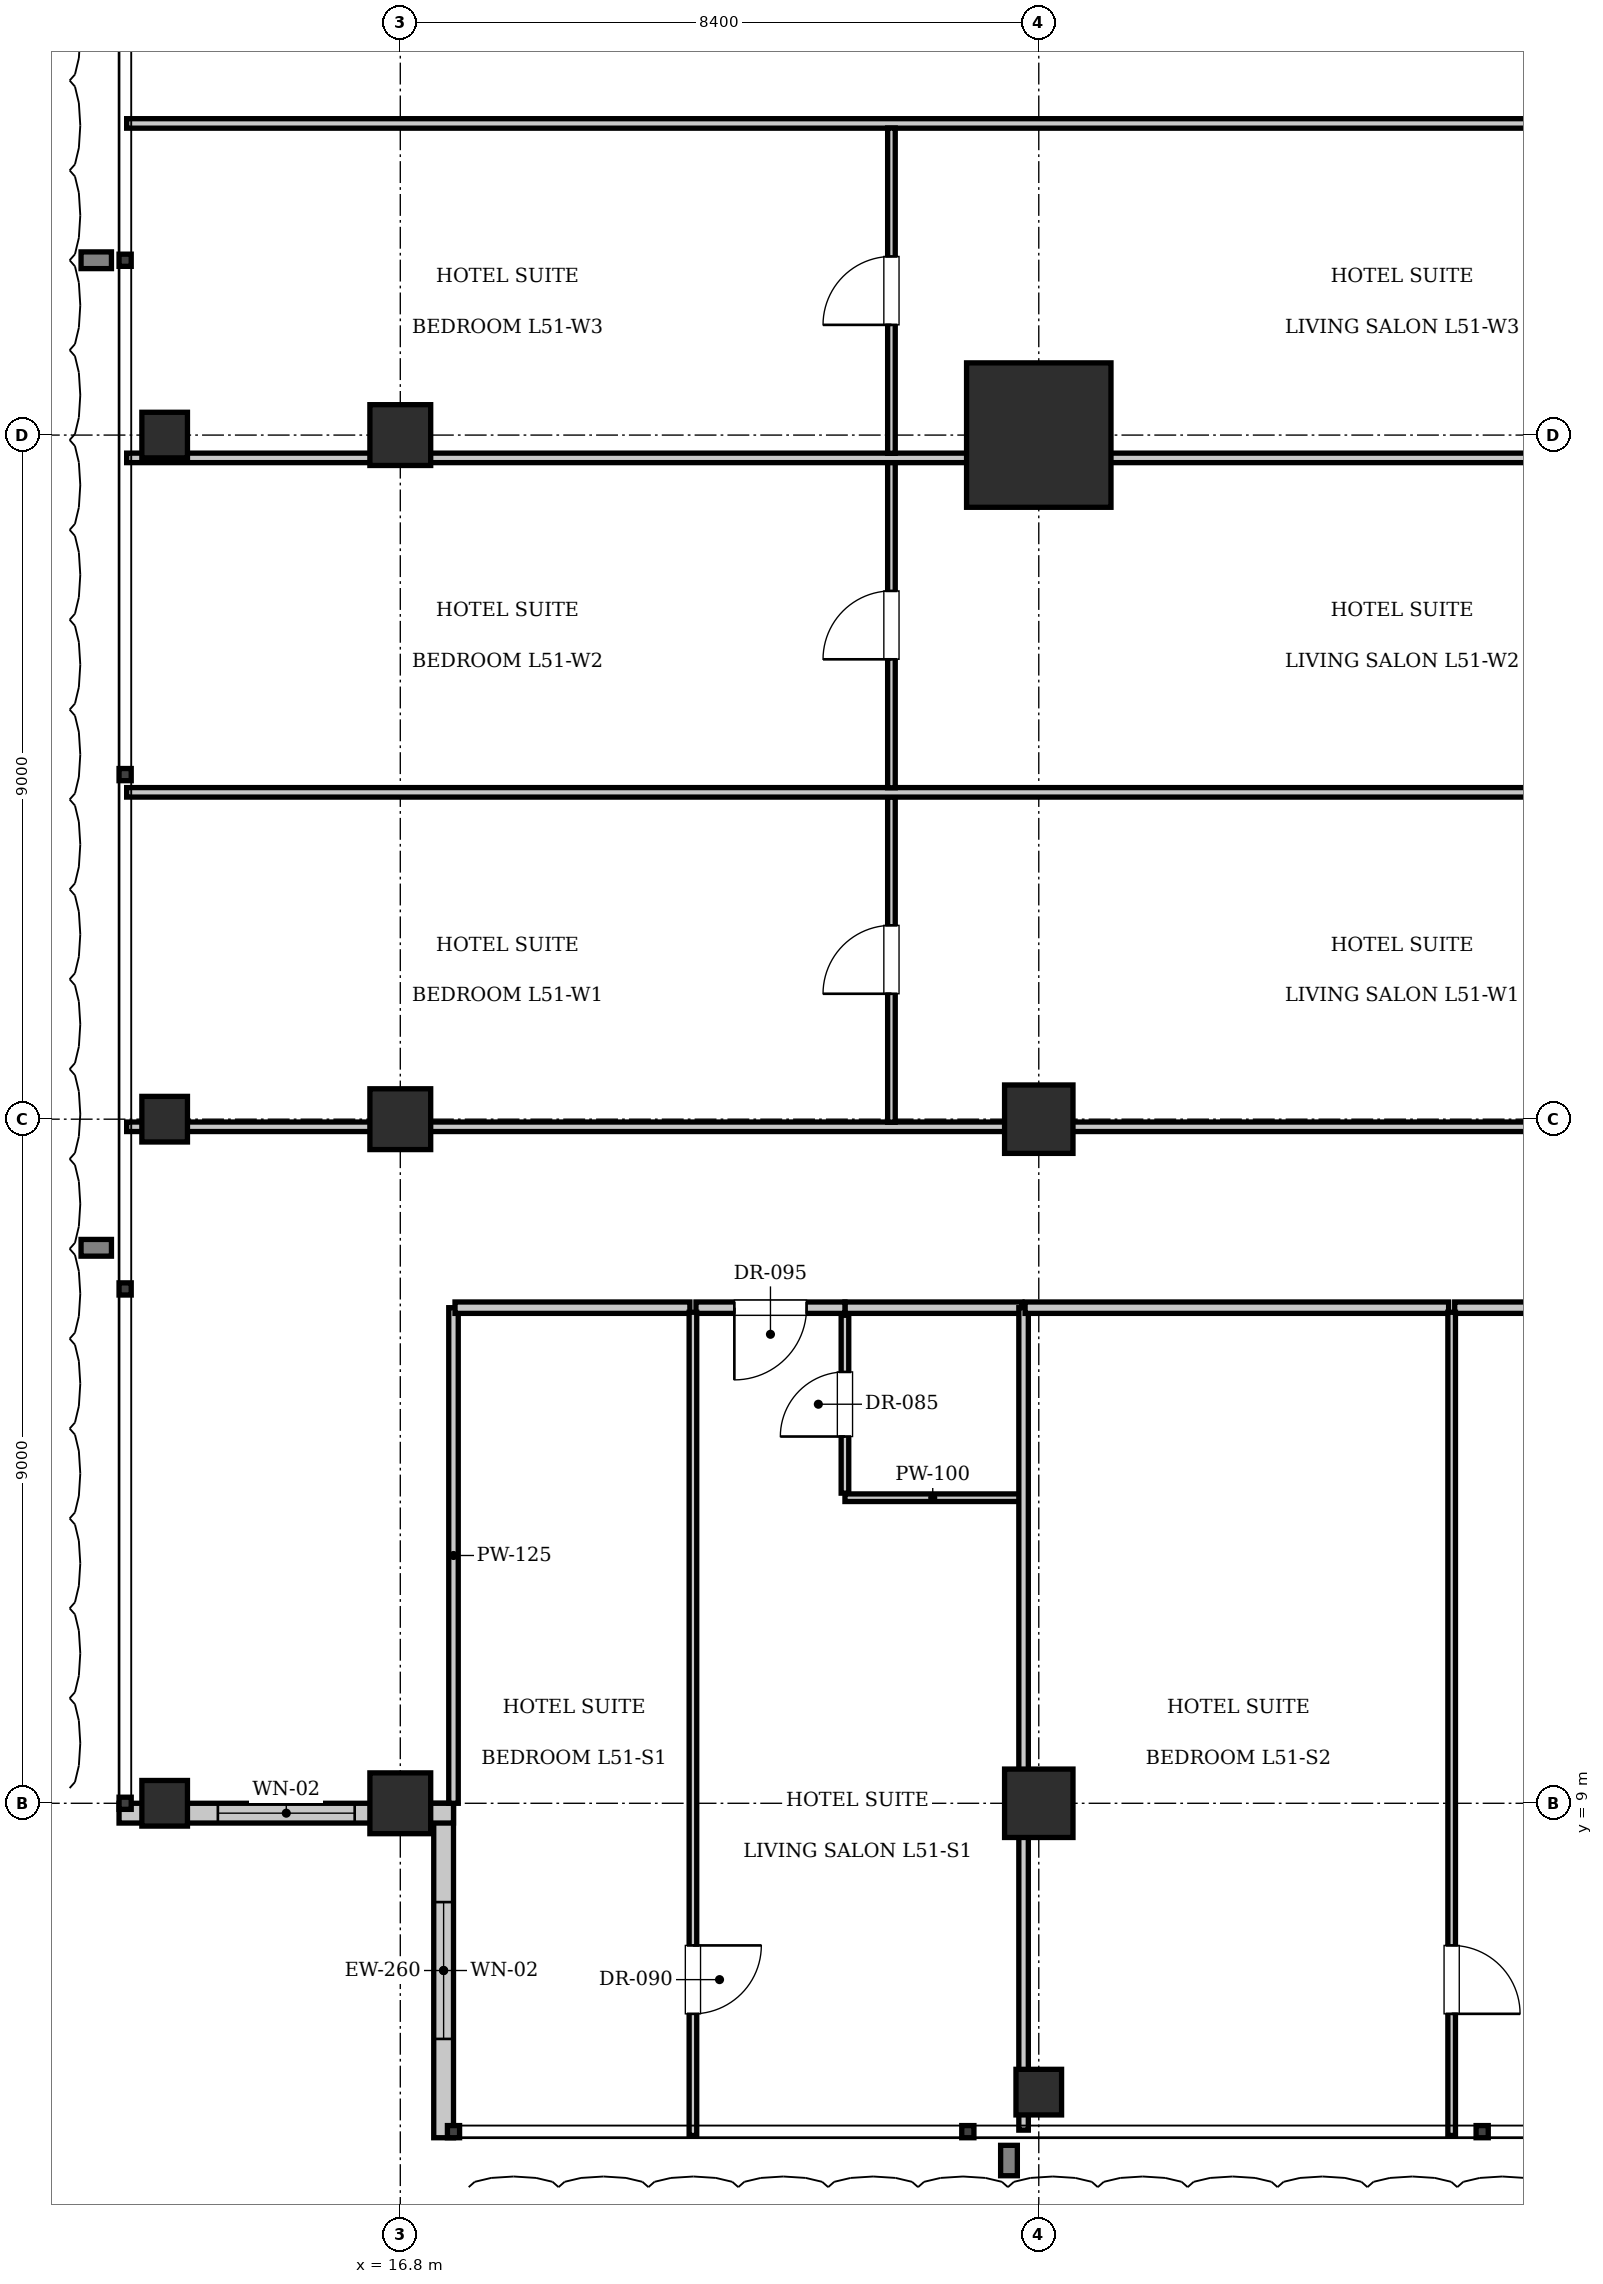
"""IFC4 building model, lengths in metres.
Left out: names, types, materials, properties, quantities, classifications, styles, units other than length and angle.
Written with IfcOpenShell. Run it as: python <this file> out.ifc"""

import sys

from ifc_helpers import new_model, si_unit, direction, frame, frame_2d, origin, origin_2d, place, context, subcontext, project, spatial, rectangle, i_section, extrude, element, fill, save


model = new_model("IFC4")
c1 = context("Model", 3, precision=1e-05, world=origin(), true_north=direction((0.0, 1.0)))
c2 = subcontext(c1, "Body", "Model", "MODEL_VIEW")
j1 = project(units=[si_unit("LENGTHUNIT", "METRE"), si_unit("PLANEANGLEUNIT", "RADIAN")], contexts=[c1])
p1 = place(None, origin())
s1 = spatial("IfcSite", under=j1, at=p1, CompositionType="ELEMENT")
p2 = place(p1, origin())
s2 = spatial("IfcBuilding", under=s1, at=p2, CompositionType="ELEMENT")
p3 = place(p2, frame((0.0, 0.0, 208.25)))
s3 = spatial("IfcBuildingStorey", under=s2, at=p3, CompositionType="ELEMENT", Elevation=208.25)
p4 = place(p3, frame((25.2, 27.0, 0.0), z_axis=(0.0, 0.0, 1.0), x_axis=(1.0, 0.0, 0.0)))
e1 = element("IfcColumn", 1, at=p4, inside=s3, PredefinedType="COLUMN", context=c2, shape_type="SweptSolid", body=[
    extrude(rectangle(XDim=1.9, YDim=1.9, at=origin_2d()), origin(), (0.0, 0.0, 1.0), 3.85),
])
for number, where, z_axis, x_axis in (
    (2, (25.2, 18.0, 0.0), (0.0, 0.0, 1.0), (1.0, 0.0, 0.0)),
    (3, (25.2, 9.0, 0.0), (0.0, 0.0, 1.0), (1.0, 0.0, 0.0)),
):
    element("IfcColumn", number, at=place(p3, frame(where, z_axis=z_axis, x_axis=x_axis)), inside=s3, PredefinedType="COLUMN", context=c2, shape_type="SweptSolid", body=[
        extrude(rectangle(XDim=0.9, YDim=0.9, at=origin_2d()), origin(), (0.0, 0.0, 1.0), 3.85),
    ])
for number, where, z_axis, x_axis in (
    (4, (16.8, 9.0, 0.0), (0.0, 0.0, 1.0), (1.0, 0.0, 0.0)),
    (5, (16.8, 18.0, 0.0), (0.0, 0.0, 1.0), (1.0, 0.0, 0.0)),
    (6, (16.8, 27.0, 0.0), (0.0, 0.0, 1.0), (1.0, 0.0, 0.0)),
):
    element("IfcColumn", number, at=place(p3, frame(where, z_axis=z_axis, x_axis=x_axis)), inside=s3, PredefinedType="COLUMN", context=c2, shape_type="SweptSolid", body=[
        extrude(rectangle(XDim=0.8, YDim=0.8, at=origin_2d()), origin(), (0.0, 0.0, 1.0), 3.85),
    ])
for number, where, z_axis, x_axis in (
    (7, (13.7, 9.0, 0.0), (0.0, 0.0, 1.0), (1.0, 0.0, 0.0)),
    (8, (13.7, 18.0, 0.0), (0.0, 0.0, 1.0), (1.0, 0.0, 0.0)),
    (9, (13.7, 27.0, 0.0), (0.0, 0.0, 1.0), (1.0, 0.0, 0.0)),
    (10, (25.2, 5.2, 0.0), (0.0, 0.0, 1.0), (1.0, 0.0, 0.0)),
):
    element("IfcColumn", number, at=place(p3, frame(where, z_axis=z_axis, x_axis=x_axis)), inside=s3, PredefinedType="COLUMN", context=c2, shape_type="SweptSolid", body=[
        extrude(i_section(OverallWidth=0.6, OverallDepth=0.6, WebThickness=0.025, FlangeThickness=0.038, at=origin_2d()), origin(), (0.0, 0.0, 1.0), 3.85),
    ])
p5 = place(p3, frame((17.37, 4.6, 0.0), z_axis=(0.0, 0.0, 1.0), x_axis=(0.0, 1.0, 0.0)))
e11 = element("IfcWall", 11, at=p5, inside=s3, PredefinedType="SOLIDWALL", context=c2, shape_type="SweptSolid", body=[
    extrude(rectangle(XDim=4.4, YDim=0.26, at=frame_2d((2.2, 0.0))), origin(), (0.0, 0.0, 1.0), 3.61),
])
p6 = place(p5, frame((1.3, 0.0, 0.9)))
e12 = element("IfcOpeningElement", 12, at=p6, cuts=e11, PredefinedType="OPENING", context=c2, shape_type="SweptSolid", body=[
    extrude(rectangle(XDim=1.8, YDim=2.1, at=frame_2d((0.9, 1.05))), frame((0.0, 0.14, 0.0), z_axis=(0.0, -1.0, 0.0), x_axis=(1.0, 0.0, 0.0)), (0.0, 0.0, 1.0), 0.28),
])
p7 = place(p3, frame((17.5, 8.87, 0.0), z_axis=(0.0, 0.0, 1.0), x_axis=(-1.0, 0.0, 0.0)))
e13 = element("IfcWall", 13, at=p7, inside=s3, PredefinedType="SOLIDWALL", context=c2, shape_type="SweptSolid", body=[
    extrude(rectangle(XDim=4.4, YDim=0.26, at=frame_2d((2.2, 0.0))), origin(), (0.0, 0.0, 1.0), 3.071),
])
p8 = place(p7, frame((1.3, 0.0, 0.9)))
e14 = element("IfcOpeningElement", 14, at=p8, cuts=e13, PredefinedType="OPENING", context=c2, shape_type="SweptSolid", body=[
    extrude(rectangle(XDim=1.8, YDim=2.1, at=frame_2d((0.9, 1.05))), frame((0.0, 0.14, 0.0), z_axis=(0.0, -1.0, 0.0), x_axis=(1.0, 0.0, 0.0)), (0.0, 0.0, 1.0), 0.28),
])
p9 = place(p3, frame((17.5, 9.0, 0.0), z_axis=(0.0, 0.0, 1.0), x_axis=(0.0, 1.0, 0.0)))
e15 = element("IfcWall", 15, at=p9, inside=s3, PredefinedType="PARTITIONING", context=c2, shape_type="SweptSolid", body=[
    extrude(rectangle(XDim=6.52, YDim=0.125, at=frame_2d((3.26, 0.0))), origin(), (0.0, 0.0, 1.0), 3.61),
])
p10 = place(p3, frame((22.65, 15.52, 0.0), z_axis=(0.0, 0.0, 1.0), x_axis=(1.0, 0.0, 0.0)))
e16 = element("IfcWall", 16, at=p10, inside=s3, PredefinedType="PARTITIONING", context=c2, shape_type="SweptSolid", body=[
    extrude(rectangle(XDim=2.33, YDim=0.15, at=frame_2d((1.165, 0.0))), origin(), (0.0, 0.0, 1.0), 3.61),
])
p11 = place(p3, frame((22.65, 13.02, 0.0), z_axis=(0.0, 0.0, 1.0), x_axis=(1.0, 0.0, 0.0)))
e17 = element("IfcWall", 17, at=p11, inside=s3, PredefinedType="PARTITIONING", context=c2, shape_type="SweptSolid", body=[
    extrude(rectangle(XDim=2.31, YDim=0.1, at=frame_2d((1.155, 0.0))), origin(), (0.0, 0.0, 1.0), 3.61),
])
p12 = place(p3, frame((22.65, 13.08, 0.0), z_axis=(0.0, 0.0, 1.0), x_axis=(0.0, 1.0, 0.0)))
e18 = element("IfcWall", 18, at=p12, inside=s3, PredefinedType="PARTITIONING", context=c2, shape_type="SweptSolid", body=[
    extrude(rectangle(XDim=2.34, YDim=0.1, at=frame_2d((1.17, 0.0))), origin(), (0.0, 0.0, 1.0), 3.61),
])
p13 = place(p12, frame((0.745, 0.0, 0.0)))
e19 = element("IfcOpeningElement", 19, at=p13, cuts=e18, PredefinedType="OPENING", context=c2, shape_type="SweptSolid", body=[
    extrude(rectangle(XDim=0.85, YDim=2.1, at=frame_2d((0.425, 1.05))), frame((0.0, 0.06, 0.0), z_axis=(0.0, -1.0, 0.0), x_axis=(1.0, 0.0, 0.0)), (0.0, 0.0, 1.0), 0.12),
])
p14 = place(p3, frame((17.52, 15.52, 0.0), z_axis=(0.0, 0.0, 1.0), x_axis=(1.0, 0.0, 0.0)))
e20 = element("IfcWall", 20, at=p14, inside=s3, PredefinedType="PARTITIONING", context=c2, shape_type="SweptSolid", body=[
    extrude(rectangle(XDim=3.09, YDim=0.15, at=frame_2d((1.545, 0.0))), origin(), (0.0, 0.0, 1.0), 3.61),
])
p15 = place(p3, frame((20.69, 15.52, 0.0), z_axis=(0.0, 0.0, 1.0), x_axis=(1.0, 0.0, 0.0)))
e21 = element("IfcWall", 21, at=p15, inside=s3, PredefinedType="PARTITIONING", context=c2, shape_type="SweptSolid", body=[
    extrude(rectangle(XDim=1.96, YDim=0.15, at=frame_2d((0.98, 0.0))), origin(), (0.0, 0.0, 1.0), 3.61),
])
p16 = place(p15, frame((0.505, 0.0, 0.0)))
e22 = element("IfcOpeningElement", 22, at=p16, cuts=e21, PredefinedType="OPENING", context=c2, shape_type="SweptSolid", body=[
    extrude(rectangle(XDim=0.95, YDim=2.15, at=frame_2d((0.475, 1.075))), frame((0.0, 0.085, 0.0), z_axis=(0.0, -1.0, 0.0), x_axis=(1.0, 0.0, 0.0)), (0.0, 0.0, 1.0), 0.17),
])
p17 = place(p3, frame((20.65, 4.63, 0.0), z_axis=(0.0, 0.0, 1.0), x_axis=(0.0, 1.0, 0.0)))
e23 = element("IfcWall", 23, at=p17, inside=s3, PredefinedType="PARTITIONING", context=c2, shape_type="SweptSolid", body=[
    extrude(rectangle(XDim=10.83, YDim=0.1, at=frame_2d((5.415, 0.0))), origin(), (0.0, 0.0, 1.0), 3.61),
])
p18 = place(p17, frame((1.6, 0.0, 0.0)))
e24 = element("IfcOpeningElement", 24, at=p18, cuts=e23, PredefinedType="OPENING", context=c2, shape_type="SweptSolid", body=[
    extrude(rectangle(XDim=0.9, YDim=2.1, at=frame_2d((0.45, 1.05))), frame((0.0, 0.06, 0.0), z_axis=(0.0, -1.0, 0.0), x_axis=(1.0, 0.0, 0.0)), (0.0, 0.0, 1.0), 0.12),
])
p19 = place(p3, frame((25.0, 4.7, 0.0), z_axis=(0.0, 0.0, 1.0), x_axis=(0.0, 1.0, 0.0)))
e25 = element("IfcWall", 25, at=p19, inside=s3, PredefinedType="PARTITIONING", context=c2, shape_type="SweptSolid", body=[
    extrude(rectangle(XDim=10.82, YDim=0.125, at=frame_2d((5.41, 0.0))), origin(), (0.0, 0.0, 1.0), 3.61),
])
p20 = place(p3, frame((25.02, 15.52, 0.0), z_axis=(0.0, 0.0, 1.0), x_axis=(1.0, 0.0, 0.0)))
e26 = element("IfcWall", 26, at=p20, inside=s3, PredefinedType="PARTITIONING", context=c2, shape_type="SweptSolid", body=[
    extrude(rectangle(XDim=5.572, YDim=0.15, at=frame_2d((2.786, 0.0))), origin(), (0.0, 0.0, 1.0), 3.61),
])
p21 = place(p3, frame((30.672, 15.52, 0.0), z_axis=(0.0, 0.0, 1.0), x_axis=(1.0, 0.0, 0.0)))
e27 = element("IfcWall", 27, at=p21, inside=s3, PredefinedType="PARTITIONING", context=c2, shape_type="SweptSolid", body=[
    extrude(rectangle(XDim=4.778, YDim=0.15, at=frame_2d((2.389, 0.0))), origin(), (0.0, 0.0, 1.0), 3.61),
])
p22 = place(p21, frame((1.914, 0.0, 0.0)))
e28 = element("IfcOpeningElement", 28, at=p22, cuts=e27, PredefinedType="OPENING", context=c2, shape_type="SweptSolid", body=[
    extrude(rectangle(XDim=0.95, YDim=2.15, at=frame_2d((0.475, 1.075))), frame((0.0, 0.085, 0.0), z_axis=(0.0, -1.0, 0.0), x_axis=(1.0, 0.0, 0.0)), (0.0, 0.0, 1.0), 0.17),
])
p23 = place(p3, frame((30.632, 4.63, 0.0), z_axis=(0.0, 0.0, 1.0), x_axis=(0.0, 1.0, 0.0)))
e29 = element("IfcWall", 29, at=p23, inside=s3, PredefinedType="PARTITIONING", context=c2, shape_type="SweptSolid", body=[
    extrude(rectangle(XDim=10.83, YDim=0.1, at=frame_2d((5.415, 0.0))), origin(), (0.0, 0.0, 1.0), 3.61),
])
p24 = place(p23, frame((1.6, 0.0, 0.0)))
e30 = element("IfcOpeningElement", 30, at=p24, cuts=e29, PredefinedType="OPENING", context=c2, shape_type="SweptSolid", body=[
    extrude(rectangle(XDim=0.9, YDim=2.1, at=frame_2d((0.45, 1.05))), frame((0.0, 0.06, 0.0), z_axis=(0.0, -1.0, 0.0), x_axis=(1.0, 0.0, 0.0)), (0.0, 0.0, 1.0), 0.12),
])
p25 = place(p3, frame((13.2, 17.9, 0.0), z_axis=(0.0, 0.0, 1.0), x_axis=(1.0, 0.0, 0.0)))
e31 = element("IfcWall", 31, at=p25, inside=s3, PredefinedType="PARTITIONING", context=c2, shape_type="SweptSolid", body=[
    extrude(rectangle(XDim=23.52, YDim=0.125, at=frame_2d((11.76, 0.0))), origin(), (0.0, 0.0, 1.0), 3.071),
])
p26 = place(p3, frame((13.2, 31.1, 0.0), z_axis=(0.0, 0.0, 1.0), x_axis=(1.0, 0.0, 0.0)))
e32 = element("IfcWall", 32, at=p26, inside=s3, PredefinedType="PARTITIONING", context=c2, shape_type="SweptSolid", body=[
    extrude(rectangle(XDim=23.52, YDim=0.125, at=frame_2d((11.76, 0.0))), origin(), (0.0, 0.0, 1.0), 3.61),
])
p27 = place(p3, frame((23.262, 17.96, 0.0), z_axis=(0.0, 0.0, 1.0), x_axis=(0.0, 1.0, 0.0)))
e33 = element("IfcWall", 33, at=p27, inside=s3, PredefinedType="PARTITIONING", context=c2, shape_type="SweptSolid", body=[
    extrude(rectangle(XDim=4.28, YDim=0.1, at=frame_2d((2.14, 0.0))), origin(), (0.0, 0.0, 1.0), 3.61),
])
p28 = place(p27, frame((1.69, 0.0, 0.0)))
e34 = element("IfcOpeningElement", 34, at=p28, cuts=e33, PredefinedType="OPENING", context=c2, shape_type="SweptSolid", body=[
    extrude(rectangle(XDim=0.9, YDim=2.1, at=frame_2d((0.45, 1.05))), frame((0.0, 0.06, 0.0), z_axis=(0.0, -1.0, 0.0), x_axis=(1.0, 0.0, 0.0)), (0.0, 0.0, 1.0), 0.12),
])
p29 = place(p3, frame((13.2, 22.3, 0.0), z_axis=(0.0, 0.0, 1.0), x_axis=(1.0, 0.0, 0.0)))
e35 = element("IfcWall", 35, at=p29, inside=s3, PredefinedType="PARTITIONING", context=c2, shape_type="SweptSolid", body=[
    extrude(rectangle(XDim=23.52, YDim=0.125, at=frame_2d((11.76, 0.0))), origin(), (0.0, 0.0, 1.0), 3.61),
])
p30 = place(p3, frame((23.262, 22.36, 0.0), z_axis=(0.0, 0.0, 1.0), x_axis=(0.0, 1.0, 0.0)))
e36 = element("IfcWall", 36, at=p30, inside=s3, PredefinedType="PARTITIONING", context=c2, shape_type="SweptSolid", body=[
    extrude(rectangle(XDim=4.28, YDim=0.1, at=frame_2d((2.14, 0.0))), origin(), (0.0, 0.0, 1.0), 3.61),
])
p31 = place(p30, frame((1.69, 0.0, 0.0)))
e37 = element("IfcOpeningElement", 37, at=p31, cuts=e36, PredefinedType="OPENING", context=c2, shape_type="SweptSolid", body=[
    extrude(rectangle(XDim=0.9, YDim=2.1, at=frame_2d((0.45, 1.05))), frame((0.0, 0.06, 0.0), z_axis=(0.0, -1.0, 0.0), x_axis=(1.0, 0.0, 0.0)), (0.0, 0.0, 1.0), 0.12),
])
p32 = place(p3, frame((13.2, 26.7, 0.0), z_axis=(0.0, 0.0, 1.0), x_axis=(1.0, 0.0, 0.0)))
e38 = element("IfcWall", 38, at=p32, inside=s3, PredefinedType="PARTITIONING", context=c2, shape_type="SweptSolid", body=[
    extrude(rectangle(XDim=23.52, YDim=0.125, at=frame_2d((11.76, 0.0))), origin(), (0.0, 0.0, 1.0), 3.61),
])
p33 = place(p3, frame((23.262, 26.76, 0.0), z_axis=(0.0, 0.0, 1.0), x_axis=(0.0, 1.0, 0.0)))
e39 = element("IfcWall", 39, at=p33, inside=s3, PredefinedType="PARTITIONING", context=c2, shape_type="SweptSolid", body=[
    extrude(rectangle(XDim=4.28, YDim=0.1, at=frame_2d((2.14, 0.0))), origin(), (0.0, 0.0, 1.0), 3.61),
])
p34 = place(p33, frame((1.69, 0.0, 0.0)))
e40 = element("IfcOpeningElement", 40, at=p34, cuts=e39, PredefinedType="OPENING", context=c2, shape_type="SweptSolid", body=[
    extrude(rectangle(XDim=0.9, YDim=2.1, at=frame_2d((0.45, 1.05))), frame((0.0, 0.06, 0.0), z_axis=(0.0, -1.0, 0.0), x_axis=(1.0, 0.0, 0.0)), (0.0, 0.0, 1.0), 0.12),
])
p35 = place(p6, origin())
e41 = element("IfcWindow", 41, at=p35, inside=s3, PartitioningType="SINGLE_PANEL", PredefinedType="WINDOW", context=c2, shape_type="SweptSolid", body=[
    extrude(rectangle(XDim=1.8, YDim=2.1, at=frame_2d((0.9, 1.05))), frame((0.0, 0.03, 0.0), z_axis=(0.0, -1.0, 0.0), x_axis=(1.0, 0.0, 0.0)), (0.0, 0.0, 1.0), 0.06),
])
fill(e12, e41)
p36 = place(p8, origin())
e42 = element("IfcWindow", 42, at=p36, inside=s3, PartitioningType="SINGLE_PANEL", PredefinedType="WINDOW", context=c2, shape_type="SweptSolid", body=[
    extrude(rectangle(XDim=1.8, YDim=2.1, at=frame_2d((0.9, 1.05))), frame((0.0, 0.03, 0.0), z_axis=(0.0, -1.0, 0.0), x_axis=(1.0, 0.0, 0.0)), (0.0, 0.0, 1.0), 0.06),
])
fill(e14, e42)
p37 = place(p13, origin())
e43 = element("IfcDoor", 43, at=p37, inside=s3, OperationType="SINGLE_SWING_LEFT", PredefinedType="DOOR", context=c2, shape_type="SweptSolid", body=[
    extrude(rectangle(XDim=0.85, YDim=2.1, at=frame_2d((0.425, 1.05))), frame((0.0, 0.025, 0.0), z_axis=(0.0, -1.0, 0.0), x_axis=(1.0, 0.0, 0.0)), (0.0, 0.0, 1.0), 0.05),
])
fill(e19, e43)
p38 = place(p16, frame((0.95, 0.0, 0.0), z_axis=(0.0, 0.0, 1.0), x_axis=(-1.0, 0.0, 0.0)))
e44 = element("IfcDoor", 44, at=p38, inside=s3, OperationType="SINGLE_SWING_RIGHT", PredefinedType="DOOR", context=c2, shape_type="SweptSolid", body=[
    extrude(rectangle(XDim=0.95, YDim=2.15, at=frame_2d((0.475, 1.075))), frame((0.0, 0.025, 0.0), z_axis=(0.0, -1.0, 0.0), x_axis=(1.0, 0.0, 0.0)), (0.0, 0.0, 1.0), 0.05),
])
fill(e22, e44)
p39 = place(p18, frame((0.9, 0.0, 0.0), z_axis=(0.0, 0.0, 1.0), x_axis=(-1.0, 0.0, 0.0)))
e45 = element("IfcDoor", 45, at=p39, inside=s3, OperationType="SINGLE_SWING_LEFT", PredefinedType="DOOR", context=c2, shape_type="SweptSolid", body=[
    extrude(rectangle(XDim=0.9, YDim=2.1, at=frame_2d((0.45, 1.05))), frame((0.0, 0.025, 0.0), z_axis=(0.0, -1.0, 0.0), x_axis=(1.0, 0.0, 0.0)), (0.0, 0.0, 1.0), 0.05),
])
fill(e24, e45)
p40 = place(p24, frame((0.9, 0.0, 0.0), z_axis=(0.0, 0.0, 1.0), x_axis=(-1.0, 0.0, 0.0)))
e46 = element("IfcDoor", 46, at=p40, inside=s3, OperationType="SINGLE_SWING_RIGHT", PredefinedType="DOOR", context=c2, shape_type="SweptSolid", body=[
    extrude(rectangle(XDim=0.9, YDim=2.1, at=frame_2d((0.45, 1.05))), frame((0.0, 0.025, 0.0), z_axis=(0.0, -1.0, 0.0), x_axis=(1.0, 0.0, 0.0)), (0.0, 0.0, 1.0), 0.05),
])
fill(e30, e46)
p41 = place(p28, origin())
e47 = element("IfcDoor", 47, at=p41, inside=s3, OperationType="SINGLE_SWING_LEFT", PredefinedType="DOOR", context=c2, shape_type="SweptSolid", body=[
    extrude(rectangle(XDim=0.9, YDim=2.1, at=frame_2d((0.45, 1.05))), frame((0.0, 0.025, 0.0), z_axis=(0.0, -1.0, 0.0), x_axis=(1.0, 0.0, 0.0)), (0.0, 0.0, 1.0), 0.05),
])
fill(e34, e47)
p42 = place(p31, origin())
e48 = element("IfcDoor", 48, at=p42, inside=s3, OperationType="SINGLE_SWING_LEFT", PredefinedType="DOOR", context=c2, shape_type="SweptSolid", body=[
    extrude(rectangle(XDim=0.9, YDim=2.1, at=frame_2d((0.45, 1.05))), frame((0.0, 0.025, 0.0), z_axis=(0.0, -1.0, 0.0), x_axis=(1.0, 0.0, 0.0)), (0.0, 0.0, 1.0), 0.05),
])
fill(e37, e48)
p43 = place(p34, origin())
e49 = element("IfcDoor", 49, at=p43, inside=s3, OperationType="SINGLE_SWING_LEFT", PredefinedType="DOOR", context=c2, shape_type="SweptSolid", body=[
    extrude(rectangle(XDim=0.9, YDim=2.1, at=frame_2d((0.45, 1.05))), frame((0.0, 0.025, 0.0), z_axis=(0.0, -1.0, 0.0), x_axis=(1.0, 0.0, 0.0)), (0.0, 0.0, 1.0), 0.05),
])
fill(e40, e49)
save(model, sys.argv[1])
